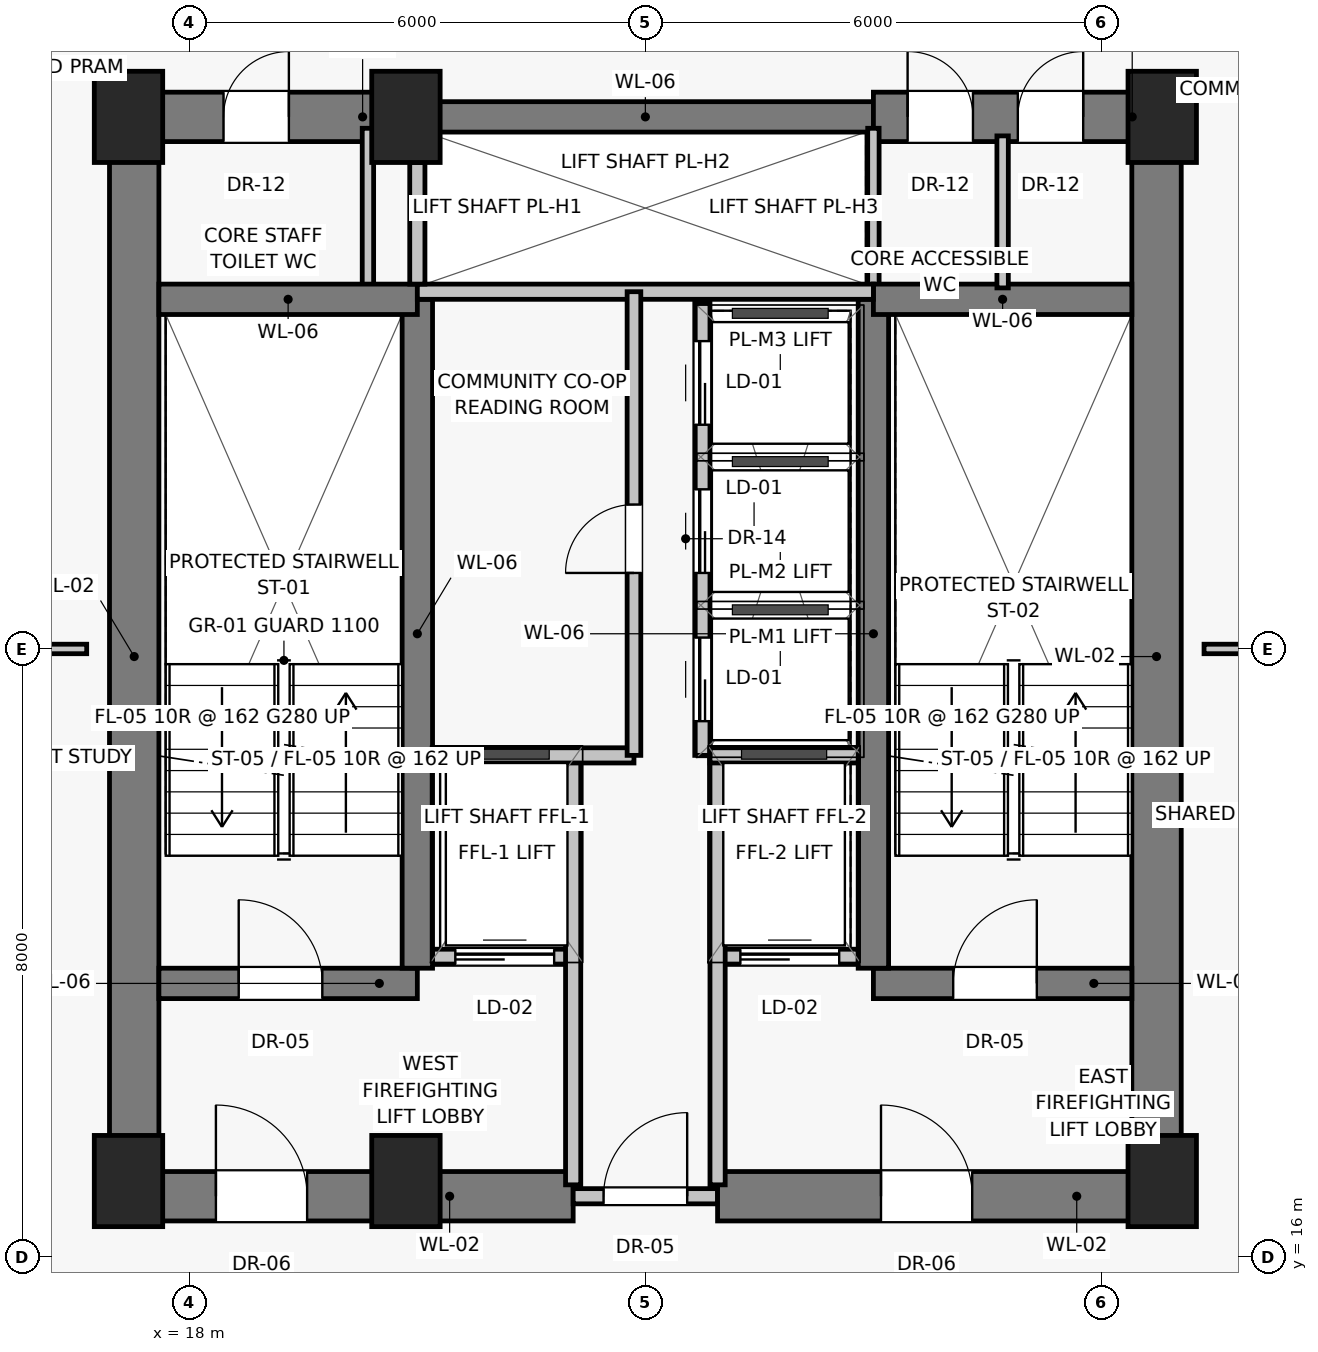
"""IFC4 building model, lengths in metres.
Left out: names, types, materials, properties, quantities, classifications, styles, units other than length and angle.
Written with IfcOpenShell. Run it as: python <this file> out.ifc"""

import sys

from ifc_helpers import new_model, si_unit, direction, frame, frame_2d, origin, origin_2d, place, context, subcontext, project, spatial, rectangle, extrude, source, transform, mapped, element, fill, save


model = new_model("IFC4")
c1 = context("Model", 3, precision=1e-05, world=origin(), true_north=direction((0.0, 1.0)))
c2 = subcontext(c1, "Body", "Model", "MODEL_VIEW")
j1 = project(units=[si_unit("LENGTHUNIT", "METRE"), si_unit("PLANEANGLEUNIT", "RADIAN")], contexts=[c1])
p1 = place(None, origin())
s1 = spatial("IfcSite", under=j1, at=p1, CompositionType="ELEMENT")
p2 = place(p1, origin())
s2 = spatial("IfcBuilding", under=s1, at=p2, CompositionType="ELEMENT")
p3 = place(p2, frame((0.0, 0.0, 152.25)))
s3 = spatial("IfcBuildingStorey", under=s2, at=p3, CompositionType="ELEMENT", Elevation=152.25)
for number, where, z_axis, x_axis in (
    (1, (17.2, 17.0, 0.0), (0.0, 0.0, 1.0), (1.0, 0.0, 0.0)),
    (2, (20.85, 17.0, 0.0), (0.0, 0.0, 1.0), (1.0, 0.0, 0.0)),
    (3, (30.8, 17.0, 0.0), (0.0, 0.0, 1.0), (1.0, 0.0, 0.0)),
    (4, (17.2, 31.0, 0.0), (0.0, 0.0, 1.0), (1.0, 0.0, 0.0)),
    (5, (20.85, 31.0, 0.0), (0.0, 0.0, 1.0), (1.0, 0.0, 0.0)),
    (6, (30.8, 31.0, 0.0), (0.0, 0.0, 1.0), (1.0, 0.0, 0.0)),
):
    element("IfcColumn", number, at=place(p3, frame(where, z_axis=z_axis, x_axis=x_axis)), inside=s3, PredefinedType="PILASTER", context=c2, shape_type="SweptSolid", body=[
        extrude(rectangle(XDim=0.9, YDim=1.2, at=origin_2d()), origin(), (0.0, 0.0, 1.0), 3.25),
    ])
for number, where, z_axis, x_axis in (
    (7, (17.275, 16.8, 0.0), (0.0, 0.0, 1.0), (0.0, 1.0, 0.0)),
    (8, (30.725, 16.8, 0.0), (0.0, 0.0, 1.0), (0.0, 1.0, 0.0)),
):
    element("IfcWall", number, at=place(p3, frame(where, z_axis=z_axis, x_axis=x_axis)), inside=s3, PredefinedType="SHEAR", context=c2, shape_type="SweptSolid", body=[
        extrude(rectangle(XDim=14.2, YDim=0.65, at=frame_2d((7.1, 0.0))), origin(), (0.0, 0.0, 1.0), 3.0),
    ])
p4 = place(p3, frame((17.2, 16.8, 0.0), z_axis=(0.0, 0.0, 1.0), x_axis=(1.0, 0.0, 0.0)))
e9 = element("IfcWall", 9, at=p4, inside=s3, PredefinedType="SHEAR", context=c2, shape_type="SweptSolid", body=[
    extrude(rectangle(XDim=5.85, YDim=0.65, at=frame_2d((2.925, 0.0))), origin(), (0.0, 0.0, 1.0), 3.0),
])
p5 = place(p4, frame((1.15, 0.0, 0.0)))
e10 = element("IfcOpeningElement", 10, at=p5, cuts=e9, PredefinedType="OPENING", context=c2, shape_type="SweptSolid", body=[
    extrude(rectangle(XDim=1.2, YDim=2.03, at=frame_2d((0.6, 1.015))), frame((0.0, 0.335, 0.0), z_axis=(0.0, -1.0, 0.0), x_axis=(1.0, 0.0, 0.0)), (0.0, 0.0, 1.0), 0.67),
])
p6 = place(p3, frame((23.05, 16.8, 0.0), z_axis=(0.0, 0.0, 1.0), x_axis=(1.0, 0.0, 0.0)))
e11 = element("IfcWall", 11, at=p6, inside=s3, PredefinedType="SOLIDWALL", context=c2, shape_type="SweptSolid", body=[
    extrude(rectangle(XDim=1.9, YDim=0.2, at=frame_2d((0.95, 0.0))), origin(), (0.0, 0.0, 1.0), 2.15),
])
p7 = place(p6, frame((0.4, 0.0, 0.0)))
e12 = element("IfcOpeningElement", 12, at=p7, cuts=e11, PredefinedType="OPENING", context=c2, shape_type="SweptSolid", body=[
    extrude(rectangle(XDim=1.1, YDim=2.03, at=frame_2d((0.55, 1.015))), frame((0.0, 0.11, 0.0), z_axis=(0.0, -1.0, 0.0), x_axis=(1.0, 0.0, 0.0)), (0.0, 0.0, 1.0), 0.22),
])
p8 = place(p3, frame((24.95, 16.8, 0.0), z_axis=(0.0, 0.0, 1.0), x_axis=(1.0, 0.0, 0.0)))
e13 = element("IfcWall", 13, at=p8, inside=s3, PredefinedType="SHEAR", context=c2, shape_type="SweptSolid", body=[
    extrude(rectangle(XDim=5.85, YDim=0.65, at=frame_2d((2.925, 0.0))), origin(), (0.0, 0.0, 1.0), 3.0),
])
p9 = place(p8, frame((2.15, 0.0, 0.0)))
e14 = element("IfcOpeningElement", 14, at=p9, cuts=e13, PredefinedType="OPENING", context=c2, shape_type="SweptSolid", body=[
    extrude(rectangle(XDim=1.2, YDim=2.03, at=frame_2d((0.6, 1.015))), frame((0.0, 0.335, 0.0), z_axis=(0.0, -1.0, 0.0), x_axis=(1.0, 0.0, 0.0)), (0.0, 0.0, 1.0), 0.67),
])
p10 = place(p3, frame((17.2, 31.0, 0.0), z_axis=(0.0, 0.0, 1.0), x_axis=(1.0, 0.0, 0.0)))
e15 = element("IfcWall", 15, at=p10, inside=s3, PredefinedType="SHEAR", context=c2, shape_type="SweptSolid", body=[
    extrude(rectangle(XDim=3.8, YDim=0.65, at=frame_2d((1.9, 0.0))), origin(), (0.0, 0.0, 1.0), 3.0),
])
p11 = place(p10, frame((1.25, 0.0, 0.0)))
e16 = element("IfcOpeningElement", 16, at=p11, cuts=e15, PredefinedType="OPENING", context=c2, shape_type="SweptSolid", body=[
    extrude(rectangle(XDim=0.86, YDim=2.01, at=frame_2d((0.43, 1.005))), frame((0.0, 0.335, 0.0), z_axis=(0.0, -1.0, 0.0), x_axis=(1.0, 0.0, 0.0)), (0.0, 0.0, 1.0), 0.67),
])
p12 = place(p3, frame((21.0, 31.0, 0.0), z_axis=(0.0, 0.0, 1.0), x_axis=(1.0, 0.0, 0.0)))
e17 = element("IfcWall", 17, at=p12, inside=s3, PredefinedType="SHEAR", context=c2, shape_type="SweptSolid", body=[
    extrude(rectangle(XDim=6.0, YDim=0.4, at=frame_2d((3.0, 0.0))), origin(), (0.0, 0.0, 1.0), 3.0),
])
p13 = place(p3, frame((27.0, 31.0, 0.0), z_axis=(0.0, 0.0, 1.0), x_axis=(1.0, 0.0, 0.0)))
e18 = element("IfcWall", 18, at=p13, inside=s3, PredefinedType="SHEAR", context=c2, shape_type="SweptSolid", body=[
    extrude(rectangle(XDim=3.8, YDim=0.65, at=frame_2d((1.9, 0.0))), origin(), (0.0, 0.0, 1.0), 3.0),
])
p14 = place(p13, frame((0.45, 0.0, 0.0)))
e19 = element("IfcOpeningElement", 19, at=p14, cuts=e18, PredefinedType="OPENING", context=c2, shape_type="SweptSolid", body=[
    extrude(rectangle(XDim=0.86, YDim=2.01, at=frame_2d((0.43, 1.005))), frame((0.0, 0.335, 0.0), z_axis=(0.0, -1.0, 0.0), x_axis=(1.0, 0.0, 0.0)), (0.0, 0.0, 1.0), 0.67),
])
p15 = place(p13, frame((1.9, 0.0, 0.0)))
e20 = element("IfcOpeningElement", 20, at=p15, cuts=e18, PredefinedType="OPENING", context=c2, shape_type="SweptSolid", body=[
    extrude(rectangle(XDim=0.86, YDim=2.01, at=frame_2d((0.43, 1.005))), frame((0.0, 0.335, 0.0), z_axis=(0.0, -1.0, 0.0), x_axis=(1.0, 0.0, 0.0)), (0.0, 0.0, 1.0), 0.67),
])
for number, where, z_axis, x_axis in (
    (21, (20.35, 28.65, 0.0), (0.0, 0.0, 1.0), (0.0, 1.0, 0.0)),
    (22, (27.0, 28.65, 0.0), (0.0, 0.0, 1.0), (0.0, 1.0, 0.0)),
):
    element("IfcWall", number, at=place(p3, frame(where, z_axis=z_axis, x_axis=x_axis)), inside=s3, PredefinedType="PARTITIONING", context=c2, shape_type="SweptSolid", body=[
        extrude(rectangle(XDim=2.2, YDim=0.15, at=frame_2d((1.1, 0.0))), origin(), (0.0, 0.0, 1.0), 3.0),
    ])
p16 = place(p3, frame((17.6, 19.6, 0.0), z_axis=(0.0, 0.0, 1.0), x_axis=(1.0, 0.0, 0.0)))
e23 = element("IfcWall", 23, at=p16, inside=s3, PredefinedType="SHEAR", context=c2, shape_type="SweptSolid", body=[
    extrude(rectangle(XDim=3.4, YDim=0.4, at=frame_2d((1.7, 0.0))), origin(), (0.0, 0.0, 1.0), 3.0),
])
p17 = place(p16, frame((1.05, 0.0, 0.0)))
e24 = element("IfcOpeningElement", 24, at=p17, cuts=e23, PredefinedType="OPENING", context=c2, shape_type="SweptSolid", body=[
    extrude(rectangle(XDim=1.1, YDim=2.03, at=frame_2d((0.55, 1.015))), frame((0.0, 0.21, 0.0), z_axis=(0.0, -1.0, 0.0), x_axis=(1.0, 0.0, 0.0)), (0.0, 0.0, 1.0), 0.42),
])
p18 = place(p3, frame((21.2, 19.95, 0.0), z_axis=(0.0, 0.0, 1.0), x_axis=(1.0, 0.0, 0.0)))
e25 = element("IfcWall", 25, at=p18, inside=s3, PredefinedType="SOLIDWALL", context=c2, shape_type="SweptSolid", body=[
    extrude(rectangle(XDim=1.85, YDim=0.2, at=frame_2d((0.925, 0.0))), origin(), (0.0, 0.0, 1.0), 3.0),
])
p19 = place(p18, frame((0.3, 0.0, 0.0)))
e26 = element("IfcOpeningElement", 26, at=p19, cuts=e25, PredefinedType="OPENING", context=c2, shape_type="SweptSolid", body=[
    extrude(rectangle(XDim=1.3, YDim=2.25, at=frame_2d((0.65, 1.125))), frame((0.0, 0.11, 0.0), z_axis=(0.0, -1.0, 0.0), x_axis=(1.0, 0.0, 0.0)), (0.0, 0.0, 1.0), 0.22),
])
p20 = place(p3, frame((24.95, 19.95, 0.0), z_axis=(0.0, 0.0, 1.0), x_axis=(1.0, 0.0, 0.0)))
e27 = element("IfcWall", 27, at=p20, inside=s3, PredefinedType="SOLIDWALL", context=c2, shape_type="SweptSolid", body=[
    extrude(rectangle(XDim=1.85, YDim=0.2, at=frame_2d((0.925, 0.0))), origin(), (0.0, 0.0, 1.0), 3.0),
])
p21 = place(p20, frame((0.3, 0.0, 0.0)))
e28 = element("IfcOpeningElement", 28, at=p21, cuts=e27, PredefinedType="OPENING", context=c2, shape_type="SweptSolid", body=[
    extrude(rectangle(XDim=1.3, YDim=2.25, at=frame_2d((0.65, 1.125))), frame((0.0, 0.11, 0.0), z_axis=(0.0, -1.0, 0.0), x_axis=(1.0, 0.0, 0.0)), (0.0, 0.0, 1.0), 0.22),
])
p22 = place(p3, frame((27.0, 19.6, 0.0), z_axis=(0.0, 0.0, 1.0), x_axis=(1.0, 0.0, 0.0)))
e29 = element("IfcWall", 29, at=p22, inside=s3, PredefinedType="SHEAR", context=c2, shape_type="SweptSolid", body=[
    extrude(rectangle(XDim=3.4, YDim=0.4, at=frame_2d((1.7, 0.0))), origin(), (0.0, 0.0, 1.0), 3.0),
])
p23 = place(p22, frame((1.05, 0.0, 0.0)))
e30 = element("IfcOpeningElement", 30, at=p23, cuts=e29, PredefinedType="OPENING", context=c2, shape_type="SweptSolid", body=[
    extrude(rectangle(XDim=1.1, YDim=2.03, at=frame_2d((0.55, 1.015))), frame((0.0, 0.21, 0.0), z_axis=(0.0, -1.0, 0.0), x_axis=(1.0, 0.0, 0.0)), (0.0, 0.0, 1.0), 0.42),
])
for number, where, z_axis, x_axis in (
    (31, (21.0, 19.8, 0.0), (0.0, 0.0, 1.0), (0.0, 1.0, 0.0)),
    (32, (27.0, 19.8, 0.0), (0.0, 0.0, 1.0), (0.0, 1.0, 0.0)),
):
    element("IfcWall", number, at=place(p3, frame(where, z_axis=z_axis, x_axis=x_axis)), inside=s3, PredefinedType="SHEAR", context=c2, shape_type="SweptSolid", body=[
        extrude(rectangle(XDim=8.8, YDim=0.4, at=frame_2d((4.4, 0.0))), origin(), (0.0, 0.0, 1.0), 3.0),
    ])
for number, where, z_axis, x_axis in (
    (33, (17.6, 28.6, 0.0), (0.0, 0.0, 1.0), (1.0, 0.0, 0.0)),
    (34, (27.0, 28.6, 0.0), (0.0, 0.0, 1.0), (1.0, 0.0, 0.0)),
):
    element("IfcWall", number, at=place(p3, frame(where, z_axis=z_axis, x_axis=x_axis)), inside=s3, PredefinedType="SHEAR", context=c2, shape_type="SweptSolid", body=[
        extrude(rectangle(XDim=3.4, YDim=0.4, at=frame_2d((1.7, 0.0))), origin(), (0.0, 0.0, 1.0), 3.0),
    ])
for number, where, z_axis, x_axis in (
    (35, (23.05, 16.95, 0.0), (0.0, 0.0, 1.0), (0.0, 1.0, 0.0)),
    (36, (24.95, 16.95, 0.0), (0.0, 0.0, 1.0), (0.0, 1.0, 0.0)),
):
    element("IfcWall", number, at=place(p3, frame(where, z_axis=z_axis, x_axis=x_axis)), inside=s3, PredefinedType="SOLIDWALL", context=c2, shape_type="SweptSolid", body=[
        extrude(rectangle(XDim=5.6, YDim=0.2, at=frame_2d((2.8, 0.0))), origin(), (0.0, 0.0, 1.0), 3.0),
    ])
p24 = place(p3, frame((21.2, 22.6, 0.0), z_axis=(0.0, 0.0, 1.0), x_axis=(1.0, 0.0, 0.0)))
e37 = element("IfcWall", 37, at=p24, inside=s3, PredefinedType="SOLIDWALL", context=c2, shape_type="SweptSolid", body=[
    extrude(rectangle(XDim=2.65, YDim=0.2, at=frame_2d((1.325, 0.0))), origin(), (0.0, 0.0, 1.0), 3.0),
])
p25 = place(p3, frame((24.85, 22.6, 0.0), z_axis=(0.0, 0.0, 1.0), x_axis=(1.0, 0.0, 0.0)))
e38 = element("IfcWall", 38, at=p25, inside=s3, PredefinedType="SOLIDWALL", context=c2, shape_type="SweptSolid", body=[
    extrude(rectangle(XDim=1.95, YDim=0.2, at=frame_2d((0.975, 0.0))), origin(), (0.0, 0.0, 1.0), 3.0),
])
p26 = place(p3, frame((21.0, 28.7, 0.0), z_axis=(0.0, 0.0, 1.0), x_axis=(1.0, 0.0, 0.0)))
e39 = element("IfcWall", 39, at=p26, inside=s3, PredefinedType="SOLIDWALL", context=c2, shape_type="SweptSolid", body=[
    extrude(rectangle(XDim=6.0, YDim=0.2, at=frame_2d((3.0, 0.0))), origin(), (0.0, 0.0, 1.0), 3.0),
])
p27 = place(p3, frame((21.0, 28.8, 0.0), z_axis=(0.0, 0.0, 1.0), x_axis=(0.0, 1.0, 0.0)))
e40 = element("IfcWall", 40, at=p27, inside=s3, PredefinedType="SOLIDWALL", context=c2, shape_type="SweptSolid", body=[
    extrude(rectangle(XDim=1.6, YDim=0.2, at=frame_2d((0.8, 0.0))), origin(), (0.0, 0.0, 1.0), 3.0),
])
p28 = place(p3, frame((23.85, 22.6, 0.0), z_axis=(0.0, 0.0, 1.0), x_axis=(0.0, 1.0, 0.0)))
e41 = element("IfcWall", 41, at=p28, inside=s3, PredefinedType="PARTITIONING", context=c2, shape_type="SweptSolid", body=[
    extrude(rectangle(XDim=6.1, YDim=0.18, at=frame_2d((3.05, 0.0))), origin(), (0.0, 0.0, 1.0), 3.0),
])
p29 = place(p28, frame((2.4, 0.0, 0.0)))
e42 = element("IfcOpeningElement", 42, at=p29, cuts=e41, PredefinedType="OPENING", context=c2, shape_type="SweptSolid", body=[
    extrude(rectangle(XDim=0.9, YDim=2.01, at=frame_2d((0.45, 1.005))), frame((0.0, 0.1, 0.0), z_axis=(0.0, -1.0, 0.0), x_axis=(1.0, 0.0, 0.0)), (0.0, 0.0, 1.0), 0.2),
])
p30 = place(p3, frame((24.75, 22.6, 0.0), z_axis=(0.0, 0.0, 1.0), x_axis=(0.0, 1.0, 0.0)))
e43 = element("IfcWall", 43, at=p30, inside=s3, PredefinedType="SOLIDWALL", context=c2, shape_type="SweptSolid", body=[
    extrude(rectangle(XDim=5.95, YDim=0.2, at=frame_2d((2.975, 0.0))), origin(), (0.0, 0.0, 1.0), 3.0),
])
p31 = place(p30, frame((0.45, 0.0, 0.0)))
e44 = element("IfcOpeningElement", 44, at=p31, cuts=e43, PredefinedType="OPENING", context=c2, shape_type="SweptSolid", body=[
    extrude(rectangle(XDim=1.1, YDim=2.08, at=frame_2d((0.55, 1.04))), frame((0.0, 0.11, 0.0), z_axis=(0.0, -1.0, 0.0), x_axis=(1.0, 0.0, 0.0)), (0.0, 0.0, 1.0), 0.22),
])
p32 = place(p30, frame((2.4, 0.0, 0.0)))
e45 = element("IfcOpeningElement", 45, at=p32, cuts=e43, PredefinedType="OPENING", context=c2, shape_type="SweptSolid", body=[
    extrude(rectangle(XDim=1.1, YDim=2.08, at=frame_2d((0.55, 1.04))), frame((0.0, 0.11, 0.0), z_axis=(0.0, -1.0, 0.0), x_axis=(1.0, 0.0, 0.0)), (0.0, 0.0, 1.0), 0.22),
])
p33 = place(p30, frame((4.35, 0.0, 0.0)))
e46 = element("IfcOpeningElement", 46, at=p33, cuts=e43, PredefinedType="OPENING", context=c2, shape_type="SweptSolid", body=[
    extrude(rectangle(XDim=1.1, YDim=2.08, at=frame_2d((0.55, 1.04))), frame((0.0, 0.11, 0.0), z_axis=(0.0, -1.0, 0.0), x_axis=(1.0, 0.0, 0.0)), (0.0, 0.0, 1.0), 0.22),
])
p34 = place(p3, frame((28.7, 28.75, 0.0), z_axis=(0.0, 0.0, 1.0), x_axis=(0.0, 1.0, 0.0)))
e47 = element("IfcWall", 47, at=p34, inside=s3, PredefinedType="PARTITIONING", context=c2, shape_type="SweptSolid", body=[
    extrude(rectangle(XDim=2.0, YDim=0.15, at=frame_2d((1.0, 0.0))), origin(), (0.0, 0.0, 1.0), 3.0),
])
for number, where, z_axis, x_axis in (
    (48, (14.55, 24.0, 0.0), (0.0, 0.0, 1.0), (1.0, 0.0, 0.0)),
    (49, (31.35, 24.0, 0.0), (0.0, 0.0, 1.0), (1.0, 0.0, 0.0)),
):
    element("IfcWall", number, at=place(p3, frame(where, z_axis=z_axis, x_axis=x_axis)), inside=s3, PredefinedType="PARTITIONING", context=c2, shape_type="SweptSolid", body=[
        extrude(rectangle(XDim=2.1, YDim=0.125, at=frame_2d((1.05, 0.0))), origin(), (0.0, 0.0, 1.0), 3.0),
    ])
m1 = source(origin(), c2, "Body", "SweptSolid", [
    extrude(rectangle(XDim=1.2, YDim=2.03, at=frame_2d((0.6, 1.015))), frame((0.0, 0.025, 0.0), z_axis=(0.0, -1.0, 0.0), x_axis=(1.0, 0.0, 0.0)), (0.0, 0.0, 1.0), 0.05),
])
p35 = place(p5, origin())
e50 = element("IfcDoor", 50, at=p35, inside=s3, OperationType="SINGLE_SWING_LEFT", PredefinedType="DOOR", context=c2, shape_type="MappedRepresentation", body=[
    mapped(m1, transform((0.0, 0.0, 0.0), scale=1.0)),
])
fill(e10, e50)
m2 = source(origin(), c2, "Body", "SweptSolid", [
    extrude(rectangle(XDim=1.1, YDim=2.03, at=frame_2d((0.55, 1.015))), frame((0.0, 0.025, 0.0), z_axis=(0.0, -1.0, 0.0), x_axis=(1.0, 0.0, 0.0)), (0.0, 0.0, 1.0), 0.05),
])
p36 = place(p7, origin())
e51 = element("IfcDoor", 51, at=p36, inside=s3, OperationType="SINGLE_SWING_RIGHT", PredefinedType="DOOR", context=c2, shape_type="MappedRepresentation", body=[
    mapped(m2, transform((0.0, 0.0, 0.0), scale=1.0)),
])
fill(e12, e51)
p37 = place(p9, origin())
e52 = element("IfcDoor", 52, at=p37, inside=s3, OperationType="SINGLE_SWING_LEFT", PredefinedType="DOOR", context=c2, shape_type="MappedRepresentation", body=[
    mapped(m1, transform((0.0, 0.0, 0.0), scale=1.0)),
])
fill(e14, e52)
m3 = source(origin(), c2, "Body", "SweptSolid", [
    extrude(rectangle(XDim=0.86, YDim=2.01, at=frame_2d((0.43, 1.005))), frame((0.0, 0.025, 0.0), z_axis=(0.0, -1.0, 0.0), x_axis=(1.0, 0.0, 0.0)), (0.0, 0.0, 1.0), 0.05),
])
p38 = place(p11, origin())
e53 = element("IfcDoor", 53, at=p38, inside=s3, OperationType="SINGLE_SWING_RIGHT", PredefinedType="DOOR", context=c2, shape_type="MappedRepresentation", body=[
    mapped(m3, transform((0.0, 0.0, 0.0), scale=1.0)),
])
fill(e16, e53)
p39 = place(p14, origin())
e54 = element("IfcDoor", 54, at=p39, inside=s3, OperationType="SINGLE_SWING_LEFT", PredefinedType="DOOR", context=c2, shape_type="MappedRepresentation", body=[
    mapped(m3, transform((0.0, 0.0, 0.0), scale=1.0)),
])
fill(e19, e54)
p40 = place(p15, origin())
e55 = element("IfcDoor", 55, at=p40, inside=s3, OperationType="SINGLE_SWING_RIGHT", PredefinedType="DOOR", context=c2, shape_type="MappedRepresentation", body=[
    mapped(m3, transform((0.0, 0.0, 0.0), scale=1.0)),
])
fill(e20, e55)
p41 = place(p17, origin())
e56 = element("IfcDoor", 56, at=p41, inside=s3, OperationType="SINGLE_SWING_LEFT", PredefinedType="DOOR", context=c2, shape_type="MappedRepresentation", body=[
    mapped(m2, transform((0.0, 0.0, 0.0), scale=1.0)),
])
fill(e24, e56)
m4 = source(origin(), c2, "Body", "SweptSolid", [
    extrude(rectangle(XDim=1.3, YDim=2.25, at=frame_2d((0.65, 1.125))), frame((0.0, 0.025, 0.0), z_axis=(0.0, -1.0, 0.0), x_axis=(1.0, 0.0, 0.0)), (0.0, 0.0, 1.0), 0.05),
])
p42 = place(p19, origin())
e57 = element("IfcDoor", 57, at=p42, inside=s3, OperationType="SLIDING_TO_LEFT", PredefinedType="DOOR", context=c2, shape_type="MappedRepresentation", body=[
    mapped(m4, transform((0.0, 0.0, 0.0), scale=1.0)),
])
fill(e26, e57)
p43 = place(p21, origin())
e58 = element("IfcDoor", 58, at=p43, inside=s3, OperationType="SLIDING_TO_LEFT", PredefinedType="DOOR", context=c2, shape_type="MappedRepresentation", body=[
    mapped(m4, transform((0.0, 0.0, 0.0), scale=1.0)),
])
fill(e28, e58)
p44 = place(p23, origin())
e59 = element("IfcDoor", 59, at=p44, inside=s3, OperationType="SINGLE_SWING_RIGHT", PredefinedType="DOOR", context=c2, shape_type="MappedRepresentation", body=[
    mapped(m2, transform((0.0, 0.0, 0.0), scale=1.0)),
])
fill(e30, e59)
m5 = source(origin(), c2, "Body", "SweptSolid", [
    extrude(rectangle(XDim=0.9, YDim=2.01, at=frame_2d((0.45, 1.005))), frame((0.0, 0.025, 0.0), z_axis=(0.0, -1.0, 0.0), x_axis=(1.0, 0.0, 0.0)), (0.0, 0.0, 1.0), 0.05),
])
p45 = place(p29, origin())
e60 = element("IfcDoor", 60, at=p45, inside=s3, OperationType="SINGLE_SWING_LEFT", PredefinedType="DOOR", context=c2, shape_type="MappedRepresentation", body=[
    mapped(m5, transform((0.0, 0.0, 0.0), scale=1.0)),
])
fill(e42, e60)
m6 = source(origin(), c2, "Body", "SweptSolid", [
    extrude(rectangle(XDim=1.1, YDim=2.08, at=frame_2d((0.55, 1.04))), frame((0.0, 0.025, 0.0), z_axis=(0.0, -1.0, 0.0), x_axis=(1.0, 0.0, 0.0)), (0.0, 0.0, 1.0), 0.05),
])
p46 = place(p31, origin())
e61 = element("IfcDoor", 61, at=p46, inside=s3, OperationType="SLIDING_TO_LEFT", PredefinedType="DOOR", context=c2, shape_type="MappedRepresentation", body=[
    mapped(m6, transform((0.0, 0.0, 0.0), scale=1.0)),
])
fill(e44, e61)
p47 = place(p32, origin())
e62 = element("IfcDoor", 62, at=p47, inside=s3, OperationType="SLIDING_TO_LEFT", PredefinedType="DOOR", context=c2, shape_type="MappedRepresentation", body=[
    mapped(m6, transform((0.0, 0.0, 0.0), scale=1.0)),
])
fill(e45, e62)
p48 = place(p33, origin())
e63 = element("IfcDoor", 63, at=p48, inside=s3, OperationType="SLIDING_TO_LEFT", PredefinedType="DOOR", context=c2, shape_type="MappedRepresentation", body=[
    mapped(m6, transform((0.0, 0.0, 0.0), scale=1.0)),
])
fill(e46, e63)
save(model, sys.argv[1])
